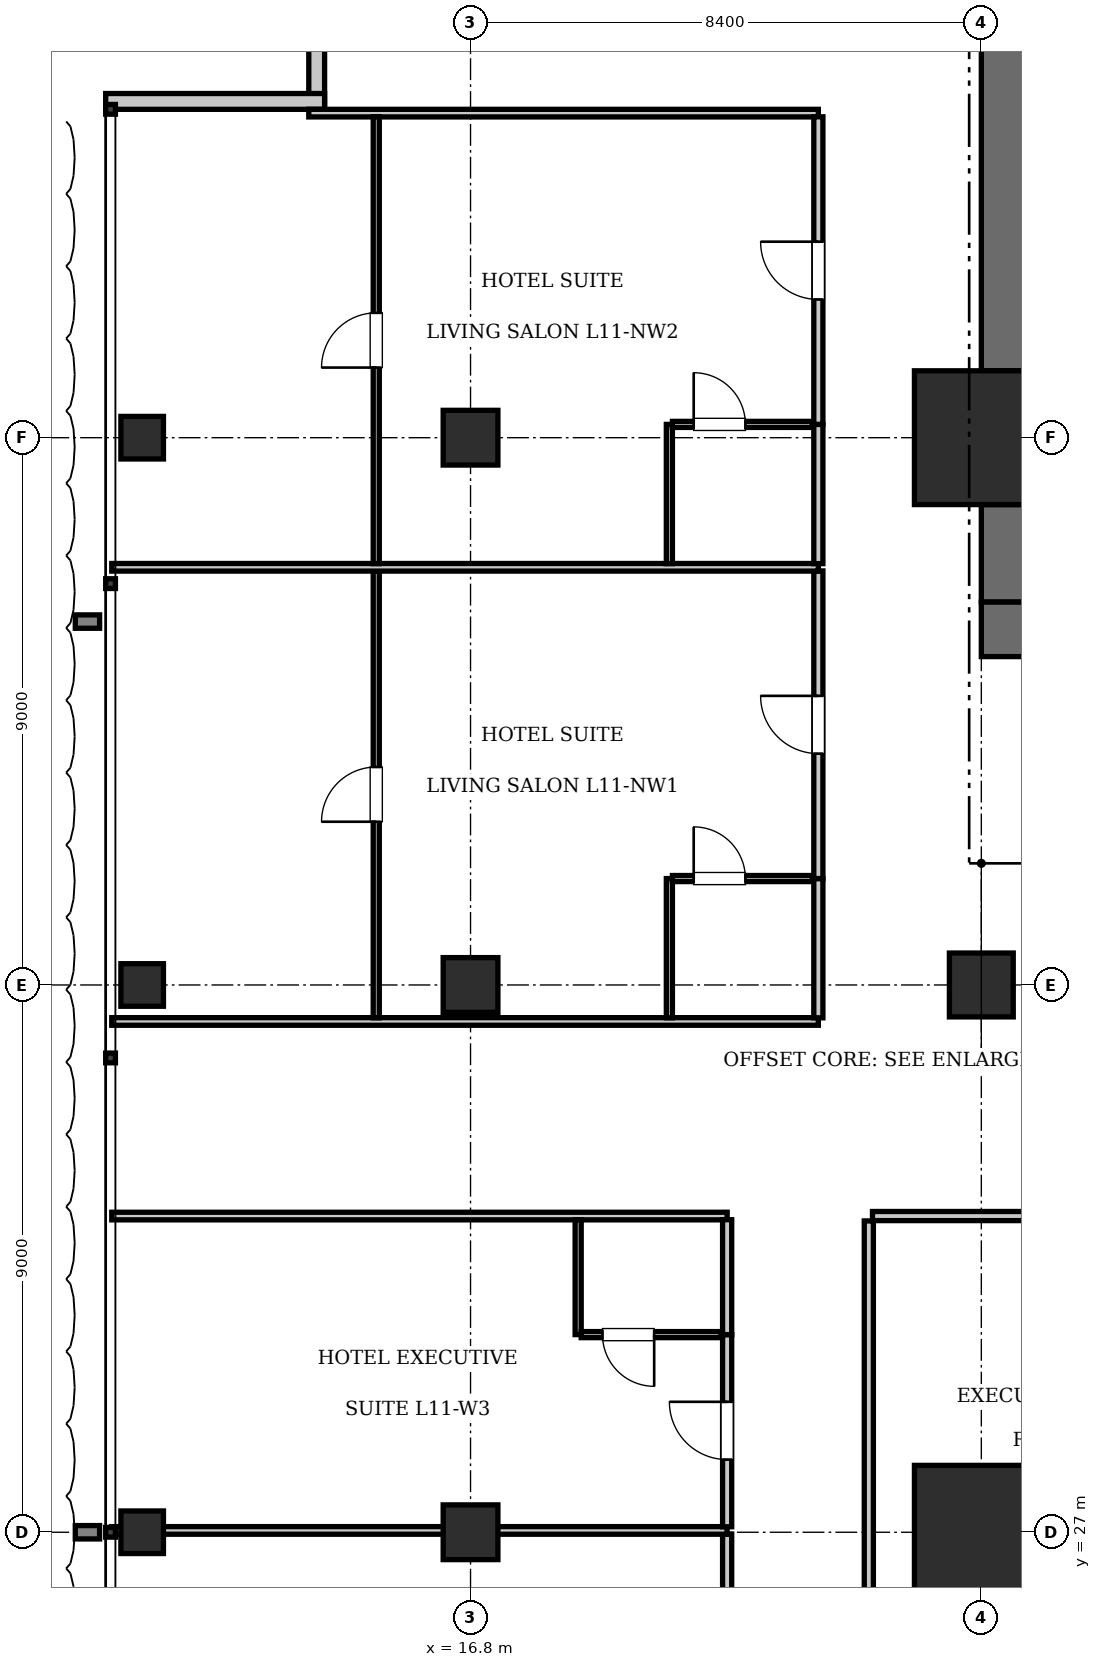
"""IFC4 building model, lengths in metres.
Left out: names, types, materials, properties, quantities, classifications, styles, units other than length and angle.
Written with IfcOpenShell. Run it as: python <this file> out.ifc"""

import sys

from ifc_helpers import new_model, si_unit, direction, frame, frame_2d, origin, origin_2d, place, context, subcontext, project, spatial, rectangle, i_section, extrude, element, fill, save


model = new_model("IFC4")
c1 = context("Model", 3, precision=1e-05, world=origin(), true_north=direction((0.0, 1.0)))
c2 = subcontext(c1, "Body", "Model", "MODEL_VIEW")
j1 = project(units=[si_unit("LENGTHUNIT", "METRE"), si_unit("PLANEANGLEUNIT", "RADIAN")], contexts=[c1])
p1 = place(None, origin())
s1 = spatial("IfcSite", under=j1, at=p1, CompositionType="ELEMENT")
p2 = place(p1, origin())
s2 = spatial("IfcBuilding", under=s1, at=p2, CompositionType="ELEMENT")
p3 = place(p2, frame((0.0, 0.0, 50.05)))
s3 = spatial("IfcBuildingStorey", under=s2, at=p3, CompositionType="ELEMENT", Elevation=50.05)
for number, where, z_axis, x_axis in (
    (1, (25.2, 27.0, 0.0), (0.0, 0.0, 1.0), (1.0, 0.0, 0.0)),
    (2, (25.2, 45.0, 0.0), (0.0, 0.0, 1.0), (1.0, 0.0, 0.0)),
):
    element("IfcColumn", number, at=place(p3, frame(where, z_axis=z_axis, x_axis=x_axis)), inside=s3, PredefinedType="COLUMN", context=c2, shape_type="SweptSolid", body=[
        extrude(rectangle(XDim=2.2, YDim=2.2, at=origin_2d()), origin(), (0.0, 0.0, 1.0), 3.85),
    ])
p4 = place(p3, frame((25.2, 41.85, 0.0), z_axis=(0.0, 0.0, 1.0), x_axis=(1.0, 0.0, 0.0)))
e3 = element("IfcWall", 3, at=p4, inside=s3, PredefinedType="SHEAR", context=c2, shape_type="SweptSolid", body=[
    extrude(rectangle(XDim=6.8, YDim=0.9, at=frame_2d((3.4, 0.0))), origin(), (0.0, 0.0, 1.0), 3.85),
])
p5 = place(p4, frame((1.65, 0.0, 0.0)))
e4 = element("IfcOpeningElement", 4, at=p5, cuts=e3, PredefinedType="OPENING", context=c2, shape_type="SweptSolid", body=[
    extrude(rectangle(XDim=1.15, YDim=2.15, at=frame_2d((0.575, 1.075))), frame((0.0, 0.46, 0.0), z_axis=(0.0, -1.0, 0.0), x_axis=(1.0, 0.0, 0.0)), (0.0, 0.0, 1.0), 0.92),
])
p6 = place(p4, frame((5.15, 0.0, 0.0)))
e5 = element("IfcOpeningElement", 5, at=p6, cuts=e3, PredefinedType="OPENING", context=c2, shape_type="SweptSolid", body=[
    extrude(rectangle(XDim=1.1, YDim=2.2, at=frame_2d((0.55, 1.1))), frame((0.0, 0.46, 0.0), z_axis=(0.0, -1.0, 0.0), x_axis=(1.0, 0.0, 0.0)), (0.0, 0.0, 1.0), 0.92),
])
p7 = place(p3, frame((25.65, 42.3, 0.0), z_axis=(0.0, 0.0, 1.0), x_axis=(0.0, 1.0, 0.0)))
e6 = element("IfcWall", 6, at=p7, inside=s3, PredefinedType="SHEAR", context=c2, shape_type="SweptSolid", body=[
    extrude(rectangle(XDim=1.6, YDim=0.9, at=frame_2d((0.8, 0.0))), origin(), (0.0, 0.0, 1.0), 3.85),
])
p8 = place(p3, frame((25.65, 46.1, 0.0), z_axis=(0.0, 0.0, 1.0), x_axis=(0.0, 1.0, 0.0)))
e7 = element("IfcWall", 7, at=p8, inside=s3, PredefinedType="SHEAR", context=c2, shape_type="SweptSolid", body=[
    extrude(rectangle(XDim=7.0, YDim=0.9, at=frame_2d((3.5, 0.0))), origin(), (0.0, 0.0, 1.0), 3.85),
])
p9 = place(p3, frame((25.2, 36.0, 0.0), z_axis=(0.0, 0.0, 1.0), x_axis=(1.0, 0.0, 0.0)))
e8 = element("IfcColumn", 8, at=p9, inside=s3, PredefinedType="COLUMN", context=c2, shape_type="SweptSolid", body=[
    extrude(rectangle(XDim=1.05, YDim=1.05, at=origin_2d()), origin(), (0.0, 0.0, 1.0), 3.85),
])
for number, where, z_axis, x_axis in (
    (9, (16.8, 27.0, 0.0), (0.0, 0.0, 1.0), (1.0, 0.0, 0.0)),
    (10, (16.8, 36.0, 0.0), (0.0, 0.0, 1.0), (1.0, 0.0, 0.0)),
    (11, (16.8, 45.0, 0.0), (0.0, 0.0, 1.0), (1.0, 0.0, 0.0)),
):
    element("IfcColumn", number, at=place(p3, frame(where, z_axis=z_axis, x_axis=x_axis)), inside=s3, PredefinedType="COLUMN", context=c2, shape_type="SweptSolid", body=[
        extrude(rectangle(XDim=0.9, YDim=0.9, at=origin_2d()), origin(), (0.0, 0.0, 1.0), 3.85),
    ])
for number, where, z_axis, x_axis in (
    (12, (11.4, 27.0, 0.0), (0.0, 0.0, 1.0), (1.0, 0.0, 0.0)),
    (13, (11.4, 36.0, 0.0), (0.0, 0.0, 1.0), (1.0, 0.0, 0.0)),
    (14, (11.4, 45.0, 0.0), (0.0, 0.0, 1.0), (1.0, 0.0, 0.0)),
):
    element("IfcColumn", number, at=place(p3, frame(where, z_axis=z_axis, x_axis=x_axis)), inside=s3, PredefinedType="COLUMN", context=c2, shape_type="SweptSolid", body=[
        extrude(i_section(OverallWidth=0.7, OverallDepth=0.7, WebThickness=0.028, FlangeThickness=0.044, at=origin_2d()), origin(), (0.0, 0.0, 1.0), 3.85),
    ])
p10 = place(p3, frame((14.27, 50.4, 0.0), z_axis=(0.0, 0.0, 1.0), x_axis=(0.0, 1.0, 0.0)))
e15 = element("IfcWall", 15, at=p10, inside=s3, PredefinedType="SOLIDWALL", context=c2, shape_type="SweptSolid", body=[
    extrude(rectangle(XDim=3.6, YDim=0.26, at=frame_2d((1.8, 0.0))), origin(), (0.0, 0.0, 1.0), 3.61),
])
p11 = place(p3, frame((10.8, 50.53, 0.0), z_axis=(0.0, 0.0, 1.0), x_axis=(1.0, 0.0, 0.0)))
e16 = element("IfcWall", 16, at=p11, inside=s3, PredefinedType="SOLIDWALL", context=c2, shape_type="SweptSolid", body=[
    extrude(rectangle(XDim=3.6, YDim=0.26, at=frame_2d((1.8, 0.0))), origin(), (0.0, 0.0, 1.0), 3.61),
])
p12 = place(p3, frame((23.35, 24.58, 0.0), z_axis=(0.0, 0.0, 1.0), x_axis=(0.0, 1.0, 0.0)))
e17 = element("IfcWall", 17, at=p12, inside=s3, PredefinedType="PARTITIONING", context=c2, shape_type="SweptSolid", body=[
    extrude(rectangle(XDim=7.54, YDim=0.15, at=frame_2d((3.77, 0.0))), origin(), (0.0, 0.0, 1.0), 3.61),
])
p13 = place(p3, frame((23.41, 32.2, 0.0), z_axis=(0.0, 0.0, 1.0), x_axis=(1.0, 0.0, 0.0)))
e18 = element("IfcWall", 18, at=p13, inside=s3, PredefinedType="PARTITIONING", context=c2, shape_type="SweptSolid", body=[
    extrude(rectangle(XDim=6.557, YDim=0.15, at=frame_2d((3.279, 0.0))), origin(), (0.0, 0.0, 1.0), 3.61),
])
p14 = place(p13, frame((2.829, 0.0, 0.0)))
e19 = element("IfcOpeningElement", 19, at=p14, cuts=e18, PredefinedType="OPENING", context=c2, shape_type="SweptSolid", body=[
    extrude(rectangle(XDim=0.9, YDim=2.1, at=frame_2d((0.45, 1.05))), frame((0.0, 0.085, 0.0), z_axis=(0.0, -1.0, 0.0), x_axis=(1.0, 0.0, 0.0)), (0.0, 0.0, 1.0), 0.17),
])
p15 = place(p3, frame((10.9, 32.2, 0.0), z_axis=(0.0, 0.0, 1.0), x_axis=(1.0, 0.0, 0.0)))
e20 = element("IfcWall", 20, at=p15, inside=s3, PredefinedType="PARTITIONING", context=c2, shape_type="SweptSolid", body=[
    extrude(rectangle(XDim=10.12, YDim=0.125, at=frame_2d((5.06, 0.0))), origin(), (0.0, 0.0, 1.0), 3.61),
])
p16 = place(p3, frame((21.02, 23.82, 0.0), z_axis=(0.0, 0.0, 1.0), x_axis=(0.0, 1.0, 0.0)))
e21 = element("IfcWall", 21, at=p16, inside=s3, PredefinedType="PARTITIONING", context=c2, shape_type="SweptSolid", body=[
    extrude(rectangle(XDim=3.15, YDim=0.15, at=frame_2d((1.575, 0.0))), origin(), (0.0, 0.0, 1.0), 3.457),
])
p17 = place(p16, frame((1.1, 0.0, 0.0)))
e22 = element("IfcOpeningElement", 22, at=p17, cuts=e21, PredefinedType="OPENING", context=c2, shape_type="SweptSolid", body=[
    extrude(rectangle(XDim=0.95, YDim=2.15, at=frame_2d((0.475, 1.075))), frame((0.0, 0.085, 0.0), z_axis=(0.0, -1.0, 0.0), x_axis=(1.0, 0.0, 0.0)), (0.0, 0.0, 1.0), 0.17),
])
p18 = place(p3, frame((10.9, 27.03, 0.0), z_axis=(0.0, 0.0, 1.0), x_axis=(1.0, 0.0, 0.0)))
e23 = element("IfcWall", 23, at=p18, inside=s3, PredefinedType="PARTITIONING", context=c2, shape_type="SweptSolid", body=[
    extrude(rectangle(XDim=10.12, YDim=0.125, at=frame_2d((5.06, 0.0))), origin(), (0.0, 0.0, 1.0), 2.988),
])
p19 = place(p3, frame((21.02, 27.09, 0.0), z_axis=(0.0, 0.0, 1.0), x_axis=(0.0, 1.0, 0.0)))
e24 = element("IfcWall", 24, at=p19, inside=s3, PredefinedType="PARTITIONING", context=c2, shape_type="SweptSolid", body=[
    extrude(rectangle(XDim=3.16, YDim=0.15, at=frame_2d((1.58, 0.0))), origin(), (0.0, 0.0, 1.0), 3.207),
])
p20 = place(p19, frame((1.105, 0.0, 0.0)))
e25 = element("IfcOpeningElement", 25, at=p20, cuts=e24, PredefinedType="OPENING", context=c2, shape_type="SweptSolid", body=[
    extrude(rectangle(XDim=0.95, YDim=2.15, at=frame_2d((0.475, 1.075))), frame((0.0, 0.085, 0.0), z_axis=(0.0, -1.0, 0.0), x_axis=(1.0, 0.0, 0.0)), (0.0, 0.0, 1.0), 0.17),
])
p21 = place(p3, frame((21.02, 30.25, 0.0), z_axis=(0.0, 0.0, 1.0), x_axis=(0.0, 1.0, 0.0)))
e26 = element("IfcWall", 26, at=p21, inside=s3, PredefinedType="PARTITIONING", context=c2, shape_type="SweptSolid", body=[
    extrude(rectangle(XDim=1.89, YDim=0.15, at=frame_2d((0.945, 0.0))), origin(), (0.0, 0.0, 1.0), 3.207),
])
p22 = place(p3, frame((18.57, 30.25, 0.0), z_axis=(0.0, 0.0, 1.0), x_axis=(0.0, 1.0, 0.0)))
e27 = element("IfcWall", 27, at=p22, inside=s3, PredefinedType="PARTITIONING", context=c2, shape_type="SweptSolid", body=[
    extrude(rectangle(XDim=1.89, YDim=0.1, at=frame_2d((0.945, 0.0))), origin(), (0.0, 0.0, 1.0), 3.61),
])
p23 = place(p3, frame((18.62, 30.25, 0.0), z_axis=(0.0, 0.0, 1.0), x_axis=(1.0, 0.0, 0.0)))
e28 = element("IfcWall", 28, at=p23, inside=s3, PredefinedType="PARTITIONING", context=c2, shape_type="SweptSolid", body=[
    extrude(rectangle(XDim=2.3, YDim=0.1, at=frame_2d((1.15, 0.0))), origin(), (0.0, 0.0, 1.0), 3.61),
])
p24 = place(p23, frame((0.35, 0.0, 0.0)))
e29 = element("IfcOpeningElement", 29, at=p24, cuts=e28, PredefinedType="OPENING", context=c2, shape_type="SweptSolid", body=[
    extrude(rectangle(XDim=0.85, YDim=2.1, at=frame_2d((0.425, 1.05))), frame((0.0, 0.06, 0.0), z_axis=(0.0, -1.0, 0.0), x_axis=(1.0, 0.0, 0.0)), (0.0, 0.0, 1.0), 0.12),
])
p25 = place(p3, frame((10.9, 35.4, 0.0), z_axis=(0.0, 0.0, 1.0), x_axis=(1.0, 0.0, 0.0)))
e30 = element("IfcWall", 30, at=p25, inside=s3, PredefinedType="PARTITIONING", context=c2, shape_type="SweptSolid", body=[
    extrude(rectangle(XDim=11.62, YDim=0.125, at=frame_2d((5.81, 0.0))), origin(), (0.0, 0.0, 1.0), 3.61),
])
p26 = place(p3, frame((14.14, 50.337, 0.0), z_axis=(0.0, 0.0, 1.0), x_axis=(1.0, 0.0, 0.0)))
e31 = element("IfcWall", 31, at=p26, inside=s3, PredefinedType="PARTITIONING", context=c2, shape_type="SweptSolid", body=[
    extrude(rectangle(XDim=8.38, YDim=0.125, at=frame_2d((4.19, 0.0))), origin(), (0.0, 0.0, 1.0), 3.61),
])
p27 = place(p3, frame((22.52, 35.46, 0.0), z_axis=(0.0, 0.0, 1.0), x_axis=(0.0, 1.0, 0.0)))
e32 = element("IfcWall", 32, at=p27, inside=s3, PredefinedType="PARTITIONING", context=c2, shape_type="SweptSolid", body=[
    extrude(rectangle(XDim=2.29, YDim=0.15, at=frame_2d((1.145, 0.0))), origin(), (0.0, 0.0, 1.0), 3.61),
])
p28 = place(p3, frame((22.52, 37.75, 0.0), z_axis=(0.0, 0.0, 1.0), x_axis=(0.0, 1.0, 0.0)))
e33 = element("IfcWall", 33, at=p28, inside=s3, PredefinedType="PARTITIONING", context=c2, shape_type="SweptSolid", body=[
    extrude(rectangle(XDim=5.059, YDim=0.15, at=frame_2d((2.529, 0.0))), origin(), (0.0, 0.0, 1.0), 3.61),
])
p29 = place(p28, frame((2.054, 0.0, 0.0)))
e34 = element("IfcOpeningElement", 34, at=p29, cuts=e33, PredefinedType="OPENING", context=c2, shape_type="SweptSolid", body=[
    extrude(rectangle(XDim=0.95, YDim=2.15, at=frame_2d((0.475, 1.075))), frame((0.0, 0.085, 0.0), z_axis=(0.0, -1.0, 0.0), x_axis=(1.0, 0.0, 0.0)), (0.0, 0.0, 1.0), 0.17),
])
p30 = place(p3, frame((20.07, 35.46, 0.0), z_axis=(0.0, 0.0, 1.0), x_axis=(0.0, 1.0, 0.0)))
e35 = element("IfcWall", 35, at=p30, inside=s3, PredefinedType="PARTITIONING", context=c2, shape_type="SweptSolid", body=[
    extrude(rectangle(XDim=2.29, YDim=0.1, at=frame_2d((1.145, 0.0))), origin(), (0.0, 0.0, 1.0), 3.61),
])
p31 = place(p3, frame((20.12, 37.75, 0.0), z_axis=(0.0, 0.0, 1.0), x_axis=(1.0, 0.0, 0.0)))
e36 = element("IfcWall", 36, at=p31, inside=s3, PredefinedType="PARTITIONING", context=c2, shape_type="SweptSolid", body=[
    extrude(rectangle(XDim=2.3, YDim=0.1, at=frame_2d((1.15, 0.0))), origin(), (0.0, 0.0, 1.0), 3.61),
])
p32 = place(p31, frame((0.35, 0.0, 0.0)))
e37 = element("IfcOpeningElement", 37, at=p32, cuts=e36, PredefinedType="OPENING", context=c2, shape_type="SweptSolid", body=[
    extrude(rectangle(XDim=0.85, YDim=2.1, at=frame_2d((0.425, 1.05))), frame((0.0, 0.06, 0.0), z_axis=(0.0, -1.0, 0.0), x_axis=(1.0, 0.0, 0.0)), (0.0, 0.0, 1.0), 0.12),
])
p33 = place(p3, frame((15.25, 35.46, 0.0), z_axis=(0.0, 0.0, 1.0), x_axis=(0.0, 1.0, 0.0)))
e38 = element("IfcWall", 38, at=p33, inside=s3, PredefinedType="PARTITIONING", context=c2, shape_type="SweptSolid", body=[
    extrude(rectangle(XDim=7.349, YDim=0.1, at=frame_2d((3.674, 0.0))), origin(), (0.0, 0.0, 1.0), 3.61),
])
p34 = place(p33, frame((3.224, 0.0, 0.0)))
e39 = element("IfcOpeningElement", 39, at=p34, cuts=e38, PredefinedType="OPENING", context=c2, shape_type="SweptSolid", body=[
    extrude(rectangle(XDim=0.9, YDim=2.1, at=frame_2d((0.45, 1.05))), frame((0.0, 0.06, 0.0), z_axis=(0.0, -1.0, 0.0), x_axis=(1.0, 0.0, 0.0)), (0.0, 0.0, 1.0), 0.12),
])
p35 = place(p3, frame((10.9, 42.869, 0.0), z_axis=(0.0, 0.0, 1.0), x_axis=(1.0, 0.0, 0.0)))
e40 = element("IfcWall", 40, at=p35, inside=s3, PredefinedType="PARTITIONING", context=c2, shape_type="SweptSolid", body=[
    extrude(rectangle(XDim=11.62, YDim=0.125, at=frame_2d((5.81, 0.0))), origin(), (0.0, 0.0, 1.0), 3.61),
])
p36 = place(p3, frame((22.52, 42.929, 0.0), z_axis=(0.0, 0.0, 1.0), x_axis=(0.0, 1.0, 0.0)))
e41 = element("IfcWall", 41, at=p36, inside=s3, PredefinedType="PARTITIONING", context=c2, shape_type="SweptSolid", body=[
    extrude(rectangle(XDim=2.29, YDim=0.15, at=frame_2d((1.145, 0.0))), origin(), (0.0, 0.0, 1.0), 3.61),
])
p37 = place(p3, frame((22.52, 45.219, 0.0), z_axis=(0.0, 0.0, 1.0), x_axis=(0.0, 1.0, 0.0)))
e42 = element("IfcWall", 42, at=p37, inside=s3, PredefinedType="PARTITIONING", context=c2, shape_type="SweptSolid", body=[
    extrude(rectangle(XDim=5.059, YDim=0.15, at=frame_2d((2.529, 0.0))), origin(), (0.0, 0.0, 1.0), 3.61),
])
p38 = place(p37, frame((2.054, 0.0, 0.0)))
e43 = element("IfcOpeningElement", 43, at=p38, cuts=e42, PredefinedType="OPENING", context=c2, shape_type="SweptSolid", body=[
    extrude(rectangle(XDim=0.95, YDim=2.15, at=frame_2d((0.475, 1.075))), frame((0.0, 0.085, 0.0), z_axis=(0.0, -1.0, 0.0), x_axis=(1.0, 0.0, 0.0)), (0.0, 0.0, 1.0), 0.17),
])
p39 = place(p3, frame((20.07, 42.929, 0.0), z_axis=(0.0, 0.0, 1.0), x_axis=(0.0, 1.0, 0.0)))
e44 = element("IfcWall", 44, at=p39, inside=s3, PredefinedType="PARTITIONING", context=c2, shape_type="SweptSolid", body=[
    extrude(rectangle(XDim=2.29, YDim=0.1, at=frame_2d((1.145, 0.0))), origin(), (0.0, 0.0, 1.0), 3.61),
])
p40 = place(p3, frame((20.12, 45.219, 0.0), z_axis=(0.0, 0.0, 1.0), x_axis=(1.0, 0.0, 0.0)))
e45 = element("IfcWall", 45, at=p40, inside=s3, PredefinedType="PARTITIONING", context=c2, shape_type="SweptSolid", body=[
    extrude(rectangle(XDim=2.3, YDim=0.1, at=frame_2d((1.15, 0.0))), origin(), (0.0, 0.0, 1.0), 3.61),
])
p41 = place(p40, frame((0.35, 0.0, 0.0)))
e46 = element("IfcOpeningElement", 46, at=p41, cuts=e45, PredefinedType="OPENING", context=c2, shape_type="SweptSolid", body=[
    extrude(rectangle(XDim=0.85, YDim=2.1, at=frame_2d((0.425, 1.05))), frame((0.0, 0.06, 0.0), z_axis=(0.0, -1.0, 0.0), x_axis=(1.0, 0.0, 0.0)), (0.0, 0.0, 1.0), 0.12),
])
p42 = place(p3, frame((15.25, 42.929, 0.0), z_axis=(0.0, 0.0, 1.0), x_axis=(0.0, 1.0, 0.0)))
e47 = element("IfcWall", 47, at=p42, inside=s3, PredefinedType="PARTITIONING", context=c2, shape_type="SweptSolid", body=[
    extrude(rectangle(XDim=7.349, YDim=0.1, at=frame_2d((3.674, 0.0))), origin(), (0.0, 0.0, 1.0), 3.61),
])
p43 = place(p42, frame((3.224, 0.0, 0.0)))
e48 = element("IfcOpeningElement", 48, at=p43, cuts=e47, PredefinedType="OPENING", context=c2, shape_type="SweptSolid", body=[
    extrude(rectangle(XDim=0.9, YDim=2.1, at=frame_2d((0.45, 1.05))), frame((0.0, 0.06, 0.0), z_axis=(0.0, -1.0, 0.0), x_axis=(1.0, 0.0, 0.0)), (0.0, 0.0, 1.0), 0.12),
])
p44 = place(p24, frame((0.85, 0.0, 0.0), z_axis=(0.0, 0.0, 1.0), x_axis=(-1.0, 0.0, 0.0)))
e49 = element("IfcDoor", 49, at=p44, inside=s3, OperationType="SINGLE_SWING_LEFT", PredefinedType="DOOR", context=c2, shape_type="SweptSolid", body=[
    extrude(rectangle(XDim=0.85, YDim=2.1, at=frame_2d((0.425, 1.05))), frame((0.0, 0.025, 0.0), z_axis=(0.0, -1.0, 0.0), x_axis=(1.0, 0.0, 0.0)), (0.0, 0.0, 1.0), 0.05),
])
fill(e29, e49)
p45 = place(p20, origin())
e50 = element("IfcDoor", 50, at=p45, inside=s3, OperationType="SINGLE_SWING_RIGHT", PredefinedType="DOOR", context=c2, shape_type="SweptSolid", body=[
    extrude(rectangle(XDim=0.95, YDim=2.15, at=frame_2d((0.475, 1.075))), frame((0.0, 0.025, 0.0), z_axis=(0.0, -1.0, 0.0), x_axis=(1.0, 0.0, 0.0)), (0.0, 0.0, 1.0), 0.05),
])
fill(e25, e50)
p46 = place(p32, origin())
e51 = element("IfcDoor", 51, at=p46, inside=s3, OperationType="SINGLE_SWING_LEFT", PredefinedType="DOOR", context=c2, shape_type="SweptSolid", body=[
    extrude(rectangle(XDim=0.85, YDim=2.1, at=frame_2d((0.425, 1.05))), frame((0.0, 0.025, 0.0), z_axis=(0.0, -1.0, 0.0), x_axis=(1.0, 0.0, 0.0)), (0.0, 0.0, 1.0), 0.05),
])
fill(e37, e51)
p47 = place(p29, origin())
e52 = element("IfcDoor", 52, at=p47, inside=s3, OperationType="SINGLE_SWING_RIGHT", PredefinedType="DOOR", context=c2, shape_type="SweptSolid", body=[
    extrude(rectangle(XDim=0.95, YDim=2.15, at=frame_2d((0.475, 1.075))), frame((0.0, 0.025, 0.0), z_axis=(0.0, -1.0, 0.0), x_axis=(1.0, 0.0, 0.0)), (0.0, 0.0, 1.0), 0.05),
])
fill(e34, e52)
p48 = place(p34, origin())
e53 = element("IfcDoor", 53, at=p48, inside=s3, OperationType="SINGLE_SWING_LEFT", PredefinedType="DOOR", context=c2, shape_type="SweptSolid", body=[
    extrude(rectangle(XDim=0.9, YDim=2.1, at=frame_2d((0.45, 1.05))), frame((0.0, 0.025, 0.0), z_axis=(0.0, -1.0, 0.0), x_axis=(1.0, 0.0, 0.0)), (0.0, 0.0, 1.0), 0.05),
])
fill(e39, e53)
p49 = place(p41, origin())
e54 = element("IfcDoor", 54, at=p49, inside=s3, OperationType="SINGLE_SWING_LEFT", PredefinedType="DOOR", context=c2, shape_type="SweptSolid", body=[
    extrude(rectangle(XDim=0.85, YDim=2.1, at=frame_2d((0.425, 1.05))), frame((0.0, 0.025, 0.0), z_axis=(0.0, -1.0, 0.0), x_axis=(1.0, 0.0, 0.0)), (0.0, 0.0, 1.0), 0.05),
])
fill(e46, e54)
p50 = place(p38, origin())
e55 = element("IfcDoor", 55, at=p50, inside=s3, OperationType="SINGLE_SWING_RIGHT", PredefinedType="DOOR", context=c2, shape_type="SweptSolid", body=[
    extrude(rectangle(XDim=0.95, YDim=2.15, at=frame_2d((0.475, 1.075))), frame((0.0, 0.025, 0.0), z_axis=(0.0, -1.0, 0.0), x_axis=(1.0, 0.0, 0.0)), (0.0, 0.0, 1.0), 0.05),
])
fill(e43, e55)
p51 = place(p43, origin())
e56 = element("IfcDoor", 56, at=p51, inside=s3, OperationType="SINGLE_SWING_LEFT", PredefinedType="DOOR", context=c2, shape_type="SweptSolid", body=[
    extrude(rectangle(XDim=0.9, YDim=2.1, at=frame_2d((0.45, 1.05))), frame((0.0, 0.025, 0.0), z_axis=(0.0, -1.0, 0.0), x_axis=(1.0, 0.0, 0.0)), (0.0, 0.0, 1.0), 0.05),
])
fill(e48, e56)
save(model, sys.argv[1])
